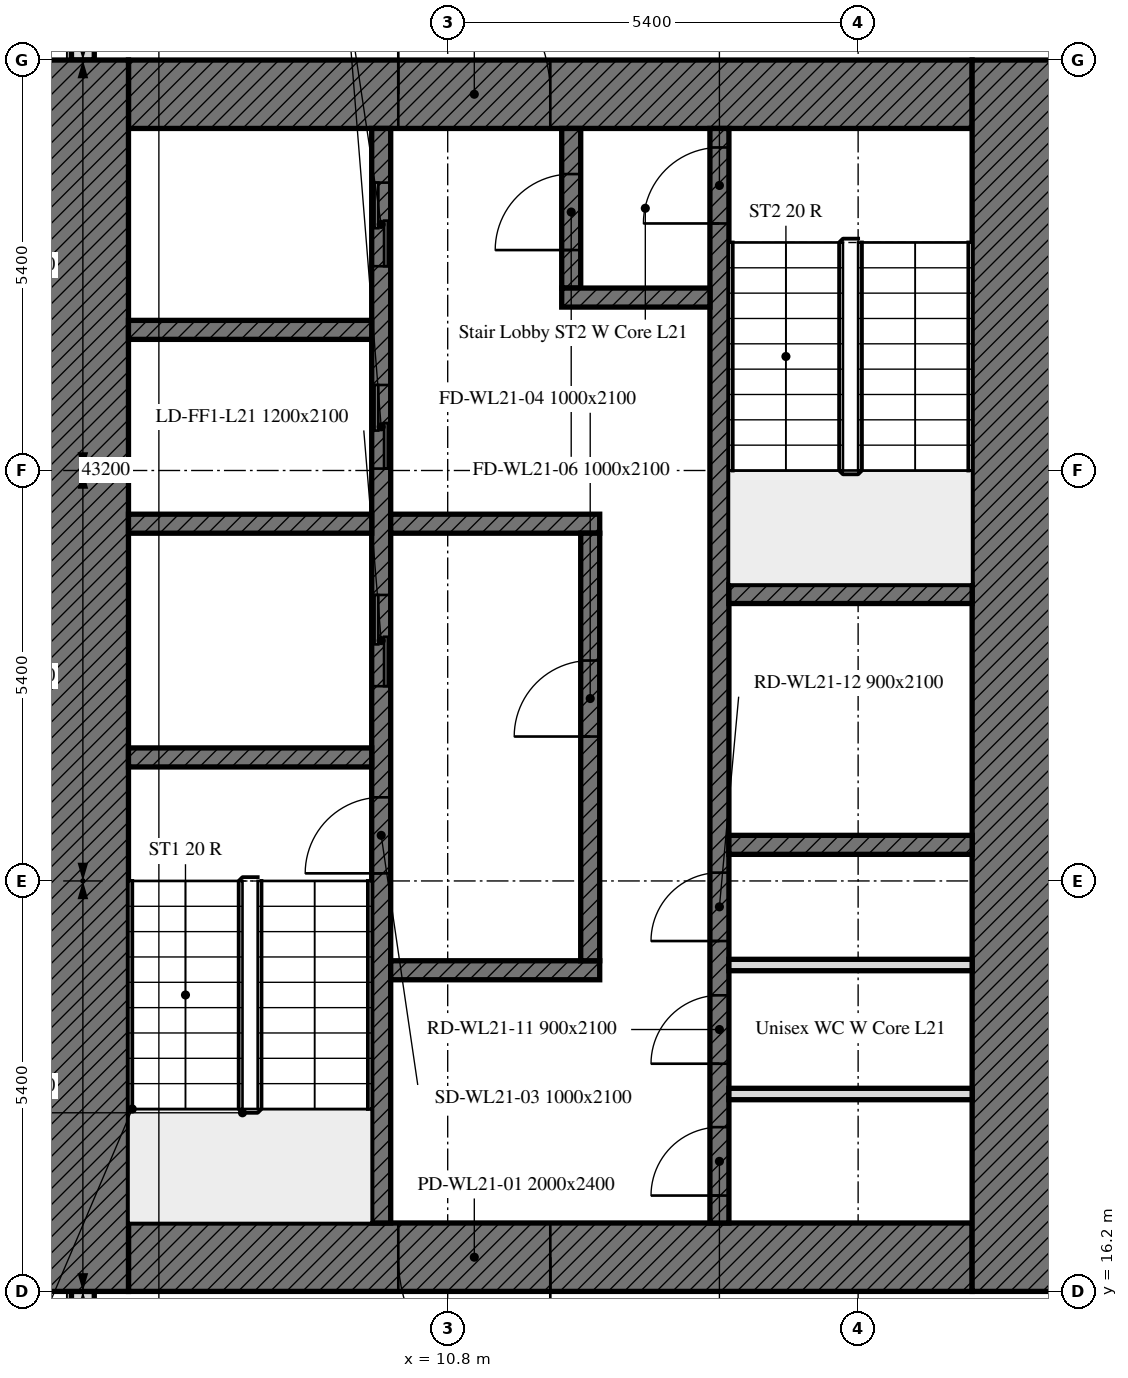
"""IFC4 building model, lengths in metres.
Left out: names, types, materials, properties, quantities, classifications, styles, units other than length and angle.
Written with IfcOpenShell. Run it as: python <this file> out.ifc"""

import sys

from ifc_helpers import new_model, si_unit, direction, frame, frame_2d, origin, place, context, subcontext, project, spatial, rectangle, extrude, element, fill, save


model = new_model("IFC4")
c1 = context("Model", 3, precision=1e-05, world=origin(), true_north=direction((0.0, 1.0)))
c2 = subcontext(c1, "Body", "Model", "MODEL_VIEW")
j1 = project(units=[si_unit("LENGTHUNIT", "METRE"), si_unit("PLANEANGLEUNIT", "RADIAN")], contexts=[c1])
p1 = place(None, origin())
s1 = spatial("IfcSite", under=j1, at=p1, CompositionType="ELEMENT")
p2 = place(p1, origin())
s2 = spatial("IfcBuilding", under=s1, at=p2, CompositionType="ELEMENT")
p3 = place(p2, frame((0.0, 0.0, 91.6)))
s3 = spatial("IfcBuildingStorey", under=s2, at=p3, CompositionType="ELEMENT", Elevation=91.6)
p4 = place(p3, frame((6.0, 43.014, 0.0), z_axis=(0.0, 0.0, 1.0), x_axis=(0.0, -1.0, 0.0)))
e1 = element("IfcWall", 1, at=p4, inside=s3, PredefinedType="SOLIDWALL", context=c2, shape_type="SweptSolid", body=[
    extrude(rectangle(XDim=10.614, YDim=0.3, at=frame_2d((5.307, 0.0))), origin(), (0.0, 0.0, 1.0), 3.5),
])
p5 = place(p4, frame((6.564, 0.0, 0.9)))
e2 = element("IfcOpeningElement", 2, at=p5, cuts=e1, PredefinedType="OPENING", context=c2, shape_type="SweptSolid", body=[
    extrude(rectangle(XDim=1.1, YDim=1.7, at=frame_2d((0.55, 0.85))), frame((0.0, 0.16, 0.0), z_axis=(0.0, -1.0, 0.0), x_axis=(1.0, 0.0, 0.0)), (0.0, 0.0, 1.0), 0.32),
])
p6 = place(p4, frame((8.164, 0.0, 0.9)))
e3 = element("IfcOpeningElement", 3, at=p6, cuts=e1, PredefinedType="OPENING", context=c2, shape_type="SweptSolid", body=[
    extrude(rectangle(XDim=1.1, YDim=1.7, at=frame_2d((0.55, 0.85))), frame((0.0, 0.16, 0.0), z_axis=(0.0, -1.0, 0.0), x_axis=(1.0, 0.0, 0.0)), (0.0, 0.0, 1.0), 0.32),
])
p7 = place(p3, frame((6.0, 16.2, 0.0), z_axis=(0.0, 0.0, 1.0), x_axis=(0.0, -1.0, 0.0)))
e4 = element("IfcWall", 4, at=p7, inside=s3, PredefinedType="SOLIDWALL", context=c2, shape_type="SweptSolid", body=[
    extrude(rectangle(XDim=5.214, YDim=0.3, at=frame_2d((2.607, 0.0))), origin(), (0.0, 0.0, 1.0), 3.5),
])
p8 = place(p7, frame((1.35, 0.0, 0.9)))
e5 = element("IfcOpeningElement", 5, at=p8, cuts=e4, PredefinedType="OPENING", context=c2, shape_type="SweptSolid", body=[
    extrude(rectangle(XDim=1.1, YDim=1.7, at=frame_2d((0.55, 0.85))), frame((0.0, 0.16, 0.0), z_axis=(0.0, -1.0, 0.0), x_axis=(1.0, 0.0, 0.0)), (0.0, 0.0, 1.0), 0.32),
])
p9 = place(p7, frame((2.95, 0.0, 0.9)))
e6 = element("IfcOpeningElement", 6, at=p9, cuts=e4, PredefinedType="OPENING", context=c2, shape_type="SweptSolid", body=[
    extrude(rectangle(XDim=1.1, YDim=1.7, at=frame_2d((0.55, 0.85))), frame((0.0, 0.16, 0.0), z_axis=(0.0, -1.0, 0.0), x_axis=(1.0, 0.0, 0.0)), (0.0, 0.0, 1.0), 0.32),
])
p10 = place(p3, frame((17.7, 16.65, 0.0), z_axis=(0.0, 0.0, 1.0), x_axis=(-1.0, 0.0, 0.0)))
e7 = element("IfcWall", 7, at=p10, inside=s3, PredefinedType="SOLIDWALL", context=c2, shape_type="SweptSolid", body=[
    extrude(rectangle(XDim=11.1, YDim=0.9, at=frame_2d((5.55, 0.0))), origin(), (0.0, 0.0, 1.0), 3.5),
])
p11 = place(p10, frame((5.55, 0.0, 0.0)))
e8 = element("IfcOpeningElement", 8, at=p11, cuts=e7, PredefinedType="OPENING", context=c2, shape_type="SweptSolid", body=[
    extrude(rectangle(XDim=2.0, YDim=2.4, at=frame_2d((1.0, 1.2))), frame((0.0, 0.45, 0.0), z_axis=(0.0, -1.0, 0.0), x_axis=(1.0, 0.0, 0.0)), (0.0, 0.0, 1.0), 0.9),
])
p12 = place(p3, frame((6.6, 31.95, 0.0), z_axis=(0.0, 0.0, 1.0), x_axis=(1.0, 0.0, 0.0)))
e9 = element("IfcWall", 9, at=p12, inside=s3, PredefinedType="SOLIDWALL", context=c2, shape_type="SweptSolid", body=[
    extrude(rectangle(XDim=11.1, YDim=0.9, at=frame_2d((5.55, 0.0))), origin(), (0.0, 0.0, 1.0), 3.5),
])
p13 = place(p12, frame((3.55, 0.0, 0.0)))
e10 = element("IfcOpeningElement", 10, at=p13, cuts=e9, PredefinedType="OPENING", context=c2, shape_type="SweptSolid", body=[
    extrude(rectangle(XDim=2.0, YDim=2.4, at=frame_2d((1.0, 1.2))), frame((0.0, 0.45, 0.0), z_axis=(0.0, -1.0, 0.0), x_axis=(1.0, 0.0, 0.0)), (0.0, 0.0, 1.0), 0.9),
])
for number, where, z_axis, x_axis in (
    (11, (6.0, 16.2, 0.0), (0.0, 0.0, 1.0), (0.0, 1.0, 0.0)),
    (12, (18.3, 32.4, 0.0), (0.0, 0.0, 1.0), (0.0, -1.0, 0.0)),
):
    element("IfcWall", number, at=place(p3, frame(where, z_axis=z_axis, x_axis=x_axis)), inside=s3, PredefinedType="SOLIDWALL", context=c2, shape_type="SweptSolid", body=[
        extrude(rectangle(XDim=16.2, YDim=1.2, at=frame_2d((8.1, 0.0))), origin(), (0.0, 0.0, 1.0), 3.5),
    ])
p14 = place(p3, frame((9.925, 17.1, 0.0), z_axis=(0.0, 0.0, 1.0), x_axis=(0.0, 1.0, 0.0)))
e13 = element("IfcWall", 13, at=p14, inside=s3, PredefinedType="SOLIDWALL", context=c2, shape_type="SweptSolid", body=[
    extrude(rectangle(XDim=14.4, YDim=0.25, at=frame_2d((7.2, 0.0))), origin(), (0.0, 0.0, 1.0), 3.5),
])
p15 = place(p14, frame((4.6, 0.0, 0.0)))
e14 = element("IfcOpeningElement", 14, at=p15, cuts=e13, PredefinedType="OPENING", context=c2, shape_type="SweptSolid", body=[
    extrude(rectangle(XDim=1.0, YDim=2.1, at=frame_2d((0.5, 1.05))), frame((0.0, 0.125, 0.0), z_axis=(0.0, -1.0, 0.0), x_axis=(1.0, 0.0, 0.0)), (0.0, 0.0, 1.0), 0.25),
])
p16 = place(p14, frame((7.062, 0.0, 0.0)))
e15 = element("IfcOpeningElement", 15, at=p16, cuts=e13, PredefinedType="OPENING", context=c2, shape_type="SweptSolid", body=[
    extrude(rectangle(XDim=1.2, YDim=2.1, at=frame_2d((0.6, 1.05))), frame((0.0, 0.125, 0.0), z_axis=(0.0, -1.0, 0.0), x_axis=(1.0, 0.0, 0.0)), (0.0, 0.0, 1.0), 0.25),
])
p17 = place(p14, frame((9.925, 0.0, 0.0)))
e16 = element("IfcOpeningElement", 16, at=p17, cuts=e13, PredefinedType="OPENING", context=c2, shape_type="SweptSolid", body=[
    extrude(rectangle(XDim=1.1, YDim=2.1, at=frame_2d((0.55, 1.05))), frame((0.0, 0.125, 0.0), z_axis=(0.0, -1.0, 0.0), x_axis=(1.0, 0.0, 0.0)), (0.0, 0.0, 1.0), 0.25),
])
p18 = place(p14, frame((12.587, 0.0, 0.0)))
e17 = element("IfcOpeningElement", 17, at=p18, cuts=e13, PredefinedType="OPENING", context=c2, shape_type="SweptSolid", body=[
    extrude(rectangle(XDim=1.1, YDim=2.1, at=frame_2d((0.55, 1.05))), frame((0.0, 0.125, 0.0), z_axis=(0.0, -1.0, 0.0), x_axis=(1.0, 0.0, 0.0)), (0.0, 0.0, 1.0), 0.25),
])
p19 = place(p3, frame((14.375, 17.1, 0.0), z_axis=(0.0, 0.0, 1.0), x_axis=(0.0, 1.0, 0.0)))
e18 = element("IfcWall", 18, at=p19, inside=s3, PredefinedType="SOLIDWALL", context=c2, shape_type="SweptSolid", body=[
    extrude(rectangle(XDim=14.4, YDim=0.25, at=frame_2d((7.2, 0.0))), origin(), (0.0, 0.0, 1.0), 3.5),
])
p20 = place(p19, frame((13.15, 0.0, 0.0)))
e19 = element("IfcOpeningElement", 19, at=p20, cuts=e18, PredefinedType="OPENING", context=c2, shape_type="SweptSolid", body=[
    extrude(rectangle(XDim=1.0, YDim=2.1, at=frame_2d((0.5, 1.05))), frame((0.0, 0.125, 0.0), z_axis=(0.0, -1.0, 0.0), x_axis=(1.0, 0.0, 0.0)), (0.0, 0.0, 1.0), 0.25),
])
p21 = place(p19, frame((0.361, 0.0, 0.0)))
e20 = element("IfcOpeningElement", 20, at=p21, cuts=e18, PredefinedType="OPENING", context=c2, shape_type="SweptSolid", body=[
    extrude(rectangle(XDim=0.9, YDim=2.1, at=frame_2d((0.45, 1.05))), frame((0.0, 0.125, 0.0), z_axis=(0.0, -1.0, 0.0), x_axis=(1.0, 0.0, 0.0)), (0.0, 0.0, 1.0), 0.25),
])
p22 = place(p19, frame((2.095, 0.0, 0.0)))
e21 = element("IfcOpeningElement", 21, at=p22, cuts=e18, PredefinedType="OPENING", context=c2, shape_type="SweptSolid", body=[
    extrude(rectangle(XDim=0.9, YDim=2.1, at=frame_2d((0.45, 1.05))), frame((0.0, 0.125, 0.0), z_axis=(0.0, -1.0, 0.0), x_axis=(1.0, 0.0, 0.0)), (0.0, 0.0, 1.0), 0.25),
])
p23 = place(p19, frame((3.709, 0.0, 0.0)))
e22 = element("IfcOpeningElement", 22, at=p23, cuts=e18, PredefinedType="OPENING", context=c2, shape_type="SweptSolid", body=[
    extrude(rectangle(XDim=0.9, YDim=2.1, at=frame_2d((0.45, 1.05))), frame((0.0, 0.125, 0.0), z_axis=(0.0, -1.0, 0.0), x_axis=(1.0, 0.0, 0.0)), (0.0, 0.0, 1.0), 0.25),
])
for number, where, z_axis, x_axis in (
    (23, (6.6, 23.225, 0.0), (0.0, 0.0, 1.0), (1.0, 0.0, 0.0)),
    (24, (14.5, 25.375, 0.0), (0.0, 0.0, 1.0), (1.0, 0.0, 0.0)),
    (25, (14.5, 22.075, 0.0), (0.0, 0.0, 1.0), (1.0, 0.0, 0.0)),
    (26, (6.6, 26.3, 0.0), (0.0, 0.0, 1.0), (1.0, 0.0, 0.0)),
):
    element("IfcWall", number, at=place(p3, frame(where, z_axis=z_axis, x_axis=x_axis)), inside=s3, PredefinedType="SOLIDWALL", context=c2, shape_type="SweptSolid", body=[
        extrude(rectangle(XDim=3.2, YDim=0.25, at=frame_2d((1.6, 0.0))), origin(), (0.0, 0.0, 1.0), 3.5),
    ])
for number, where, z_axis, x_axis in (
    (27, (10.05, 26.3, 0.0), (0.0, 0.0, 1.0), (1.0, 0.0, 0.0)),
    (28, (10.05, 20.425, 0.0), (0.0, 0.0, 1.0), (1.0, 0.0, 0.0)),
):
    element("IfcWall", number, at=place(p3, frame(where, z_axis=z_axis, x_axis=x_axis)), inside=s3, PredefinedType="SOLIDWALL", context=c2, shape_type="SweptSolid", body=[
        extrude(rectangle(XDim=2.75, YDim=0.25, at=frame_2d((1.375, 0.0))), origin(), (0.0, 0.0, 1.0), 3.5),
    ])
p24 = place(p3, frame((12.425, 29.4, 0.0), z_axis=(0.0, 0.0, 1.0), x_axis=(0.0, 1.0, 0.0)))
e29 = element("IfcWall", 29, at=p24, inside=s3, PredefinedType="SOLIDWALL", context=c2, shape_type="SweptSolid", body=[
    extrude(rectangle(XDim=2.1, YDim=0.25, at=frame_2d((1.05, 0.0))), origin(), (0.0, 0.0, 1.0), 3.5),
])
p25 = place(p24, frame((0.5, 0.0, 0.0)))
e30 = element("IfcOpeningElement", 30, at=p25, cuts=e29, PredefinedType="OPENING", context=c2, shape_type="SweptSolid", body=[
    extrude(rectangle(XDim=1.0, YDim=2.1, at=frame_2d((0.5, 1.05))), frame((0.0, 0.125, 0.0), z_axis=(0.0, -1.0, 0.0), x_axis=(1.0, 0.0, 0.0)), (0.0, 0.0, 1.0), 0.25),
])
p26 = place(p3, frame((12.3, 29.275, 0.0), z_axis=(0.0, 0.0, 1.0), x_axis=(1.0, 0.0, 0.0)))
e31 = element("IfcWall", 31, at=p26, inside=s3, PredefinedType="SOLIDWALL", context=c2, shape_type="SweptSolid", body=[
    extrude(rectangle(XDim=1.95, YDim=0.25, at=frame_2d((0.975, 0.0))), origin(), (0.0, 0.0, 1.0), 3.5),
])
p27 = place(p3, frame((12.675, 20.55, 0.0), z_axis=(0.0, 0.0, 1.0), x_axis=(0.0, 1.0, 0.0)))
e32 = element("IfcWall", 32, at=p27, inside=s3, PredefinedType="SOLIDWALL", context=c2, shape_type="SweptSolid", body=[
    extrude(rectangle(XDim=5.625, YDim=0.25, at=frame_2d((2.812, 0.0))), origin(), (0.0, 0.0, 1.0), 3.5),
])
p28 = place(p27, frame((2.95, 0.0, 0.0)))
e33 = element("IfcOpeningElement", 33, at=p28, cuts=e32, PredefinedType="OPENING", context=c2, shape_type="SweptSolid", body=[
    extrude(rectangle(XDim=1.0, YDim=2.1, at=frame_2d((0.5, 1.05))), frame((0.0, 0.125, 0.0), z_axis=(0.0, -1.0, 0.0), x_axis=(1.0, 0.0, 0.0)), (0.0, 0.0, 1.0), 0.25),
])
p29 = place(p3, frame((6.6, 28.85, 0.0), z_axis=(0.0, 0.0, 1.0), x_axis=(1.0, 0.0, 0.0)))
e34 = element("IfcWall", 34, at=p29, inside=s3, PredefinedType="SOLIDWALL", context=c2, shape_type="SweptSolid", body=[
    extrude(rectangle(XDim=3.2, YDim=0.25, at=frame_2d((1.6, 0.0))), origin(), (0.0, 0.0, 1.0), 3.5),
])
for number, where, z_axis, x_axis in (
    (35, (14.5, 18.797, 0.0), (0.0, 0.0, 1.0), (1.0, 0.0, 0.0)),
    (36, (14.5, 20.494, 0.0), (0.0, 0.0, 1.0), (1.0, 0.0, 0.0)),
):
    element("IfcWall", number, at=place(p3, frame(where, z_axis=z_axis, x_axis=x_axis)), inside=s3, PredefinedType="PARTITIONING", context=c2, shape_type="SweptSolid", body=[
        extrude(rectangle(XDim=3.2, YDim=0.15, at=frame_2d((1.6, 0.0))), origin(), (0.0, 0.0, 1.0), 3.5),
    ])
p30 = place(p11, origin())
e37 = element("IfcDoor", 37, at=p30, inside=s3, OperationType="DOUBLE_DOOR_SINGLE_SWING", PredefinedType="DOOR", context=c2, shape_type="SweptSolid", body=[
    extrude(rectangle(XDim=2.0, YDim=2.4, at=frame_2d((1.0, 1.2))), frame((0.0, 0.025, 0.0), z_axis=(0.0, -1.0, 0.0), x_axis=(1.0, 0.0, 0.0)), (0.0, 0.0, 1.0), 0.05),
])
fill(e8, e37)
p31 = place(p13, origin())
e38 = element("IfcDoor", 38, at=p31, inside=s3, OperationType="DOUBLE_DOOR_SINGLE_SWING", PredefinedType="DOOR", context=c2, shape_type="SweptSolid", body=[
    extrude(rectangle(XDim=2.0, YDim=2.4, at=frame_2d((1.0, 1.2))), frame((0.0, 0.025, 0.0), z_axis=(0.0, -1.0, 0.0), x_axis=(1.0, 0.0, 0.0)), (0.0, 0.0, 1.0), 0.05),
])
fill(e10, e38)
p32 = place(p15, origin())
e39 = element("IfcDoor", 39, at=p32, inside=s3, OperationType="SINGLE_SWING_LEFT", PredefinedType="DOOR", context=c2, shape_type="SweptSolid", body=[
    extrude(rectangle(XDim=1.0, YDim=2.1, at=frame_2d((0.5, 1.05))), frame((0.0, 0.025, 0.0), z_axis=(0.0, -1.0, 0.0), x_axis=(1.0, 0.0, 0.0)), (0.0, 0.0, 1.0), 0.05),
])
fill(e14, e39)
p33 = place(p28, origin())
e40 = element("IfcDoor", 40, at=p33, inside=s3, OperationType="SINGLE_SWING_LEFT", PredefinedType="DOOR", context=c2, shape_type="SweptSolid", body=[
    extrude(rectangle(XDim=1.0, YDim=2.1, at=frame_2d((0.5, 1.05))), frame((0.0, 0.025, 0.0), z_axis=(0.0, -1.0, 0.0), x_axis=(1.0, 0.0, 0.0)), (0.0, 0.0, 1.0), 0.05),
])
fill(e33, e40)
p34 = place(p20, origin())
e41 = element("IfcDoor", 41, at=p34, inside=s3, OperationType="SINGLE_SWING_LEFT", PredefinedType="DOOR", context=c2, shape_type="SweptSolid", body=[
    extrude(rectangle(XDim=1.0, YDim=2.1, at=frame_2d((0.5, 1.05))), frame((0.0, 0.025, 0.0), z_axis=(0.0, -1.0, 0.0), x_axis=(1.0, 0.0, 0.0)), (0.0, 0.0, 1.0), 0.05),
])
fill(e19, e41)
p35 = place(p25, origin())
e42 = element("IfcDoor", 42, at=p35, inside=s3, OperationType="SINGLE_SWING_LEFT", PredefinedType="DOOR", context=c2, shape_type="SweptSolid", body=[
    extrude(rectangle(XDim=1.0, YDim=2.1, at=frame_2d((0.5, 1.05))), frame((0.0, 0.025, 0.0), z_axis=(0.0, -1.0, 0.0), x_axis=(1.0, 0.0, 0.0)), (0.0, 0.0, 1.0), 0.05),
])
fill(e30, e42)
p36 = place(p16, origin())
e43 = element("IfcDoor", 43, at=p36, inside=s3, OperationType="DOUBLE_DOOR_SLIDING", PredefinedType="DOOR", context=c2, shape_type="SweptSolid", body=[
    extrude(rectangle(XDim=1.2, YDim=2.1, at=frame_2d((0.6, 1.05))), frame((0.0, 0.025, 0.0), z_axis=(0.0, -1.0, 0.0), x_axis=(1.0, 0.0, 0.0)), (0.0, 0.0, 1.0), 0.05),
])
fill(e15, e43)
p37 = place(p17, origin())
e44 = element("IfcDoor", 44, at=p37, inside=s3, OperationType="DOUBLE_DOOR_SLIDING", PredefinedType="DOOR", context=c2, shape_type="SweptSolid", body=[
    extrude(rectangle(XDim=1.1, YDim=2.1, at=frame_2d((0.55, 1.05))), frame((0.0, 0.025, 0.0), z_axis=(0.0, -1.0, 0.0), x_axis=(1.0, 0.0, 0.0)), (0.0, 0.0, 1.0), 0.05),
])
fill(e16, e44)
p38 = place(p18, origin())
e45 = element("IfcDoor", 45, at=p38, inside=s3, OperationType="DOUBLE_DOOR_SLIDING", PredefinedType="DOOR", context=c2, shape_type="SweptSolid", body=[
    extrude(rectangle(XDim=1.1, YDim=2.1, at=frame_2d((0.55, 1.05))), frame((0.0, 0.025, 0.0), z_axis=(0.0, -1.0, 0.0), x_axis=(1.0, 0.0, 0.0)), (0.0, 0.0, 1.0), 0.05),
])
fill(e17, e45)
p39 = place(p21, origin())
e46 = element("IfcDoor", 46, at=p39, inside=s3, OperationType="SINGLE_SWING_LEFT", PredefinedType="DOOR", context=c2, shape_type="SweptSolid", body=[
    extrude(rectangle(XDim=0.9, YDim=2.1, at=frame_2d((0.45, 1.05))), frame((0.0, 0.025, 0.0), z_axis=(0.0, -1.0, 0.0), x_axis=(1.0, 0.0, 0.0)), (0.0, 0.0, 1.0), 0.05),
])
fill(e20, e46)
p40 = place(p22, origin())
e47 = element("IfcDoor", 47, at=p40, inside=s3, OperationType="SINGLE_SWING_LEFT", PredefinedType="DOOR", context=c2, shape_type="SweptSolid", body=[
    extrude(rectangle(XDim=0.9, YDim=2.1, at=frame_2d((0.45, 1.05))), frame((0.0, 0.025, 0.0), z_axis=(0.0, -1.0, 0.0), x_axis=(1.0, 0.0, 0.0)), (0.0, 0.0, 1.0), 0.05),
])
fill(e21, e47)
p41 = place(p23, origin())
e48 = element("IfcDoor", 48, at=p41, inside=s3, OperationType="SINGLE_SWING_LEFT", PredefinedType="DOOR", context=c2, shape_type="SweptSolid", body=[
    extrude(rectangle(XDim=0.9, YDim=2.1, at=frame_2d((0.45, 1.05))), frame((0.0, 0.025, 0.0), z_axis=(0.0, -1.0, 0.0), x_axis=(1.0, 0.0, 0.0)), (0.0, 0.0, 1.0), 0.05),
])
fill(e22, e48)
save(model, sys.argv[1])
